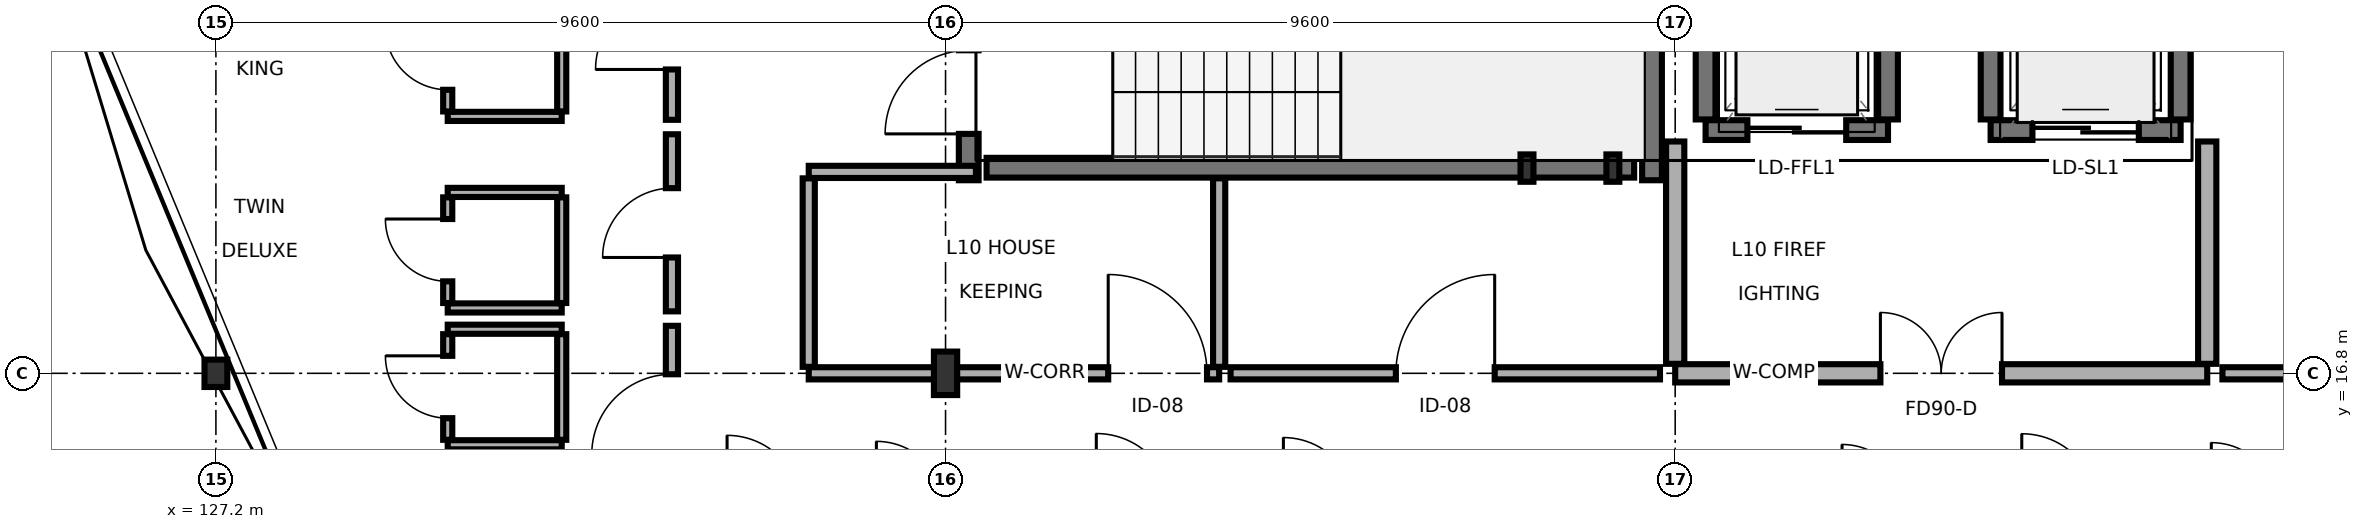
"""IFC4 building model, lengths in metres.
Left out: names, types, materials, properties, quantities, classifications, styles, units other than length and angle.
Written with IfcOpenShell. Run it as: python <this file> out.ifc"""

import sys

from ifc_helpers import new_model, si_unit, direction, frame, frame_2d, origin, origin_2d, place, context, subcontext, project, spatial, rectangle, i_section, extrude, element, fill, save


model = new_model("IFC4")
c1 = context("Model", 3, precision=1e-05, world=origin(), true_north=direction((0.0, 1.0)))
c2 = subcontext(c1, "Body", "Model", "MODEL_VIEW")
j1 = project(units=[si_unit("LENGTHUNIT", "METRE"), si_unit("PLANEANGLEUNIT", "RADIAN")], contexts=[c1])
p1 = place(None, origin())
s1 = spatial("IfcSite", under=j1, at=p1, CompositionType="ELEMENT")
p2 = place(p1, origin())
s2 = spatial("IfcBuilding", under=s1, at=p2, CompositionType="ELEMENT")
p3 = place(p2, frame((0.0, 0.0, 35.1)))
s3 = spatial("IfcBuildingStorey", under=s2, at=p3, CompositionType="ELEMENT", Elevation=35.1)
p4 = place(p3, frame((136.8, 16.8, 0.0), z_axis=(0.0, 0.0, 1.0), x_axis=(1.0, 0.0, 0.0)))
e1 = element("IfcColumn", 1, at=p4, inside=s3, PredefinedType="COLUMN", context=c2, shape_type="SweptSolid", body=[
    extrude(i_section(OverallWidth=0.306, OverallDepth=0.572, WebThickness=0.021, FlangeThickness=0.04, FilletRadius=0.027, at=origin_2d()), origin(), (0.0, 0.0, 1.0), 3.4),
])
for number, where, z_axis, x_axis in (
    (2, (144.45, 19.5, 0.0), (0.0, 0.0, 1.0), (1.0, 0.0, 0.0)),
    (3, (145.58, 19.5, 0.0), (0.0, 0.0, 1.0), (1.0, 0.0, 0.0)),
):
    element("IfcColumn", number, at=place(p3, frame(where, z_axis=z_axis, x_axis=x_axis)), inside=s3, PredefinedType="PILASTER", context=c2, shape_type="SweptSolid", body=[
        extrude(i_section(OverallWidth=0.17, OverallDepth=0.36, WebThickness=0.008, FlangeThickness=0.013, FilletRadius=0.018, at=origin_2d()), origin(), (0.0, 0.0, 1.0), 3.4),
    ])
p5 = place(p3, frame((127.2, 16.8, 0.0), z_axis=(0.0, 0.0, 1.0), x_axis=(1.0, 0.0, 0.0)))
e4 = element("IfcColumn", 4, at=p5, inside=s3, PredefinedType="COLUMN", context=c2, shape_type="SweptSolid", body=[
    extrude(i_section(OverallWidth=0.3, OverallDepth=0.36, WebThickness=0.012, FlangeThickness=0.022, FilletRadius=0.027, at=origin_2d()), origin(), (0.0, 0.0, 1.0), 3.4),
])
p6 = place(p3, frame((137.105, 19.34, 0.0), z_axis=(0.0, 0.0, 1.0), x_axis=(0.0, 1.0, 0.0)))
e5 = element("IfcWall", 5, at=p6, inside=s3, PredefinedType="SHEAR", context=c2, shape_type="SweptSolid", body=[
    extrude(rectangle(XDim=4.27, YDim=0.26, at=frame_2d((2.135, 0.0))), origin(), (0.0, 0.0, 1.0), 3.165),
])
p7 = place(p6, frame((0.61, 0.0, 0.0)))
e6 = element("IfcOpeningElement", 6, at=p7, cuts=e5, PredefinedType="OPENING", context=c2, shape_type="SweptSolid", body=[
    extrude(rectangle(XDim=1.1, YDim=2.2, at=frame_2d((0.55, 1.1))), frame((0.0, 0.14, 0.0), z_axis=(0.0, -1.0, 0.0), x_axis=(1.0, 0.0, 0.0)), (0.0, 0.0, 1.0), 0.28),
])
p8 = place(p3, frame((146.095, 19.34, 0.0), z_axis=(0.0, 0.0, 1.0), x_axis=(0.0, 1.0, 0.0)))
e7 = element("IfcWall", 7, at=p8, inside=s3, PredefinedType="SHEAR", context=c2, shape_type="SweptSolid", body=[
    extrude(rectangle(XDim=4.27, YDim=0.26, at=frame_2d((2.135, 0.0))), origin(), (0.0, 0.0, 1.0), 3.165),
])
p9 = place(p3, frame((137.34, 19.505, 0.0), z_axis=(0.0, 0.0, 1.0), x_axis=(1.0, 0.0, 0.0)))
e8 = element("IfcWall", 8, at=p9, inside=s3, PredefinedType="SHEAR", context=c2, shape_type="SweptSolid", body=[
    extrude(rectangle(XDim=8.52, YDim=0.26, at=frame_2d((4.26, 0.0))), origin(), (0.0, 0.0, 1.0), 3.165),
])
p10 = place(p3, frame((146.8, 20.0, 0.0), z_axis=(0.0, 0.0, 1.0), x_axis=(1.0, 0.0, 0.0)))
e9 = element("IfcWall", 9, at=p10, inside=s3, PredefinedType="SHEAR", context=c2, shape_type="SweptSolid", body=[
    extrude(rectangle(XDim=2.4, YDim=0.26, at=frame_2d((1.2, 0.0))), origin(), (0.0, 0.0, 1.0), 3.165),
])
p11 = place(p10, frame((0.55, 0.0, 0.0)))
e10 = element("IfcOpeningElement", 10, at=p11, cuts=e9, PredefinedType="OPENING", context=c2, shape_type="SweptSolid", body=[
    extrude(rectangle(XDim=1.3, YDim=2.25, at=frame_2d((0.65, 1.125))), frame((0.0, 0.14, 0.0), z_axis=(0.0, -1.0, 0.0), x_axis=(1.0, 0.0, 0.0)), (0.0, 0.0, 1.0), 0.28),
])
for number, where, z_axis, x_axis in (
    (11, (146.8, 20.14, 0.0), (0.0, 0.0, 1.0), (0.0, 1.0, 0.0)),
    (12, (149.2, 20.14, 0.0), (0.0, 0.0, 1.0), (0.0, 1.0, 0.0)),
):
    element("IfcWall", number, at=place(p3, frame(where, z_axis=z_axis, x_axis=x_axis)), inside=s3, PredefinedType="SHEAR", context=c2, shape_type="SweptSolid", body=[
        extrude(rectangle(XDim=2.52, YDim=0.26, at=frame_2d((1.26, 0.0))), origin(), (0.0, 0.0, 1.0), 3.165),
    ])
p12 = place(p3, frame((150.55, 20.0, 0.0), z_axis=(0.0, 0.0, 1.0), x_axis=(1.0, 0.0, 0.0)))
e13 = element("IfcWall", 13, at=p12, inside=s3, PredefinedType="SHEAR", context=c2, shape_type="SweptSolid", body=[
    extrude(rectangle(XDim=2.5, YDim=0.26, at=frame_2d((1.25, 0.0))), origin(), (0.0, 0.0, 1.0), 3.165),
])
p13 = place(p12, frame((0.55, 0.0, 0.0)))
e14 = element("IfcOpeningElement", 14, at=p13, cuts=e13, PredefinedType="OPENING", context=c2, shape_type="SweptSolid", body=[
    extrude(rectangle(XDim=1.4, YDim=2.3, at=frame_2d((0.7, 1.15))), frame((0.0, 0.14, 0.0), z_axis=(0.0, -1.0, 0.0), x_axis=(1.0, 0.0, 0.0)), (0.0, 0.0, 1.0), 0.28),
])
for number, where, z_axis, x_axis in (
    (15, (150.55, 20.14, 0.0), (0.0, 0.0, 1.0), (0.0, 1.0, 0.0)),
    (16, (153.05, 20.14, 0.0), (0.0, 0.0, 1.0), (0.0, 1.0, 0.0)),
):
    element("IfcWall", number, at=place(p3, frame(where, z_axis=z_axis, x_axis=x_axis)), inside=s3, PredefinedType="SHEAR", context=c2, shape_type="SweptSolid", body=[
        extrude(rectangle(XDim=2.52, YDim=0.26, at=frame_2d((1.26, 0.0))), origin(), (0.0, 0.0, 1.0), 3.165),
    ])
p14 = place(p3, frame((146.4, 16.8, 0.0), z_axis=(0.0, 0.0, 1.0), x_axis=(1.0, 0.0, 0.0)))
e17 = element("IfcWall", 17, at=p14, inside=s3, PredefinedType="SOLIDWALL", context=c2, shape_type="SweptSolid", body=[
    extrude(rectangle(XDim=7.0, YDim=0.24, at=frame_2d((3.5, 0.0))), origin(), (0.0, 0.0, 1.0), 2.7),
])
p15 = place(p14, frame((2.7, 0.0, 0.0)))
e18 = element("IfcOpeningElement", 18, at=p15, cuts=e17, PredefinedType="OPENING", context=c2, shape_type="SweptSolid", body=[
    extrude(rectangle(XDim=1.6, YDim=2.2, at=frame_2d((0.8, 1.1))), frame((0.0, 0.13, 0.0), z_axis=(0.0, -1.0, 0.0), x_axis=(1.0, 0.0, 0.0)), (0.0, 0.0, 1.0), 0.26),
])
for number, where, z_axis, x_axis in (
    (19, (146.4, 16.925, 0.0), (0.0, 0.0, 1.0), (0.0, 1.0, 0.0)),
    (20, (153.4, 16.925, 0.0), (0.0, 0.0, 1.0), (0.0, 1.0, 0.0)),
):
    element("IfcWall", number, at=place(p3, frame(where, z_axis=z_axis, x_axis=x_axis)), inside=s3, PredefinedType="SOLIDWALL", context=c2, shape_type="SweptSolid", body=[
        extrude(rectangle(XDim=2.925, YDim=0.24, at=frame_2d((1.462, 0.0))), origin(), (0.0, 0.0, 1.0), 2.7),
    ])
p16 = place(p3, frame((135.0, 16.8, 0.0), z_axis=(0.0, 0.0, 1.0), x_axis=(1.0, 0.0, 0.0)))
e21 = element("IfcWall", 21, at=p16, inside=s3, PredefinedType="PARTITIONING", context=c2, shape_type="SweptSolid", body=[
    extrude(rectangle(XDim=5.4, YDim=0.16, at=frame_2d((2.7, 0.0))), origin(), (0.0, 0.0, 1.0), 2.7),
])
p17 = place(p16, frame((3.94, 0.0, 0.0)))
e22 = element("IfcOpeningElement", 22, at=p17, cuts=e21, PredefinedType="OPENING", context=c2, shape_type="SweptSolid", body=[
    extrude(rectangle(XDim=1.3, YDim=2.2, at=frame_2d((0.65, 1.1))), frame((0.0, 0.09, 0.0), z_axis=(0.0, -1.0, 0.0), x_axis=(1.0, 0.0, 0.0)), (0.0, 0.0, 1.0), 0.18),
])
p18 = place(p3, frame((135.0, 16.885, 0.0), z_axis=(0.0, 0.0, 1.0), x_axis=(0.0, 1.0, 0.0)))
e23 = element("IfcWall", 23, at=p18, inside=s3, PredefinedType="PARTITIONING", context=c2, shape_type="SweptSolid", body=[
    extrude(rectangle(XDim=2.48, YDim=0.16, at=frame_2d((1.24, 0.0))), origin(), (0.0, 0.0, 1.0), 2.75),
])
p19 = place(p3, frame((140.4, 16.885, 0.0), z_axis=(0.0, 0.0, 1.0), x_axis=(0.0, 1.0, 0.0)))
e24 = element("IfcWall", 24, at=p19, inside=s3, PredefinedType="PARTITIONING", context=c2, shape_type="SweptSolid", body=[
    extrude(rectangle(XDim=2.48, YDim=0.16, at=frame_2d((1.24, 0.0))), origin(), (0.0, 0.0, 1.0), 2.7),
])
p20 = place(p3, frame((135.0, 19.45, 0.0), z_axis=(0.0, 0.0, 1.0), x_axis=(1.0, 0.0, 0.0)))
e25 = element("IfcWall", 25, at=p20, inside=s3, PredefinedType="PARTITIONING", context=c2, shape_type="SweptSolid", body=[
    extrude(rectangle(XDim=2.2, YDim=0.16, at=frame_2d((1.1, 0.0))), origin(), (0.0, 0.0, 1.0), 2.7),
])
p21 = place(p3, frame((140.55, 16.8, 0.0), z_axis=(0.0, 0.0, 1.0), x_axis=(1.0, 0.0, 0.0)))
e26 = element("IfcWall", 26, at=p21, inside=s3, PredefinedType="PARTITIONING", context=c2, shape_type="SweptSolid", body=[
    extrude(rectangle(XDim=5.65, YDim=0.16, at=frame_2d((2.825, 0.0))), origin(), (0.0, 0.0, 1.0), 2.7),
])
p22 = place(p21, frame((2.175, 0.0, 0.0)))
e27 = element("IfcOpeningElement", 27, at=p22, cuts=e26, PredefinedType="OPENING", context=c2, shape_type="SweptSolid", body=[
    extrude(rectangle(XDim=1.3, YDim=2.2, at=frame_2d((0.65, 1.1))), frame((0.0, 0.09, 0.0), z_axis=(0.0, -1.0, 0.0), x_axis=(1.0, 0.0, 0.0)), (0.0, 0.0, 1.0), 0.18),
])
p23 = place(p3, frame((153.6, 16.8, 0.0), z_axis=(0.0, 0.0, 1.0), x_axis=(1.0, 0.0, 0.0)))
e28 = element("IfcWall", 28, at=p23, inside=s3, PredefinedType="PARTITIONING", context=c2, shape_type="SweptSolid", body=[
    extrude(rectangle(XDim=1.8, YDim=0.16, at=frame_2d((0.9, 0.0))), origin(), (0.0, 0.0, 1.0), 2.7),
])
p24 = place(p3, frame((133.2, 20.135, 0.0), z_axis=(0.0, 0.0, 1.0), x_axis=(0.0, 1.0, 0.0)))
e29 = element("IfcWall", 29, at=p24, inside=s3, PredefinedType="PARTITIONING", context=c2, shape_type="SweptSolid", body=[
    extrude(rectangle(XDim=2.33, YDim=0.16, at=frame_2d((1.165, 0.0))), origin(), (0.0, 0.0, 1.0), 3.165),
])
p25 = place(p24, frame((0.663, 0.0, 0.0)))
e30 = element("IfcOpeningElement", 30, at=p25, cuts=e29, PredefinedType="OPENING", context=c2, shape_type="SweptSolid", body=[
    extrude(rectangle(XDim=1.005, YDim=2.05, at=frame_2d((0.502, 1.025))), frame((0.0, 0.09, 0.0), z_axis=(0.0, -1.0, 0.0), x_axis=(1.0, 0.0, 0.0)), (0.0, 0.0, 1.0), 0.18),
])
p26 = place(p3, frame((130.25, 20.18, 0.0), z_axis=(0.0, 0.0, 1.0), x_axis=(1.0, 0.0, 0.0)))
e31 = element("IfcWall", 31, at=p26, inside=s3, PredefinedType="PARTITIONING", context=c2, shape_type="SweptSolid", body=[
    extrude(rectangle(XDim=1.5, YDim=0.12, at=frame_2d((0.75, 0.0))), origin(), (0.0, 0.0, 1.0), 3.165),
])
p27 = place(p3, frame((130.25, 20.245, 0.0), z_axis=(0.0, 0.0, 1.0), x_axis=(0.0, 1.0, 0.0)))
e32 = element("IfcWall", 32, at=p27, inside=s3, PredefinedType="PARTITIONING", context=c2, shape_type="SweptSolid", body=[
    extrude(rectangle(XDim=1.39, YDim=0.12, at=frame_2d((0.695, 0.0))), origin(), (0.0, 0.0, 1.0), 3.165),
])
p28 = place(p27, frame((0.285, 0.0, 0.0)))
e33 = element("IfcOpeningElement", 33, at=p28, cuts=e32, PredefinedType="OPENING", context=c2, shape_type="SweptSolid", body=[
    extrude(rectangle(XDim=0.82, YDim=2.08, at=frame_2d((0.41, 1.04))), frame((0.0, 0.07, 0.0), z_axis=(0.0, -1.0, 0.0), x_axis=(1.0, 0.0, 0.0)), (0.0, 0.0, 1.0), 0.14),
])
p29 = place(p3, frame((131.75, 20.245, 0.0), z_axis=(0.0, 0.0, 1.0), x_axis=(0.0, 1.0, 0.0)))
e34 = element("IfcWall", 34, at=p29, inside=s3, PredefinedType="PARTITIONING", context=c2, shape_type="SweptSolid", body=[
    extrude(rectangle(XDim=1.39, YDim=0.12, at=frame_2d((0.695, 0.0))), origin(), (0.0, 0.0, 1.0), 3.165),
])
p30 = place(p3, frame((133.2, 17.615, 0.0), z_axis=(0.0, 0.0, 1.0), x_axis=(0.0, 1.0, 0.0)))
e35 = element("IfcWall", 35, at=p30, inside=s3, PredefinedType="PARTITIONING", context=c2, shape_type="SweptSolid", body=[
    extrude(rectangle(XDim=2.33, YDim=0.16, at=frame_2d((1.165, 0.0))), origin(), (0.0, 0.0, 1.0), 3.165),
])
p31 = place(p30, frame((0.709, 0.0, 0.0)))
e36 = element("IfcOpeningElement", 36, at=p31, cuts=e35, PredefinedType="OPENING", context=c2, shape_type="SweptSolid", body=[
    extrude(rectangle(XDim=0.912, YDim=2.13, at=frame_2d((0.456, 1.065))), frame((0.0, 0.09, 0.0), z_axis=(0.0, -1.0, 0.0), x_axis=(1.0, 0.0, 0.0)), (0.0, 0.0, 1.0), 0.18),
])
for number, where, z_axis, x_axis in (
    (37, (130.25, 17.66, 0.0), (0.0, 0.0, 1.0), (1.0, 0.0, 0.0)),
    (38, (130.25, 19.18, 0.0), (0.0, 0.0, 1.0), (1.0, 0.0, 0.0)),
):
    element("IfcWall", number, at=place(p3, frame(where, z_axis=z_axis, x_axis=x_axis)), inside=s3, PredefinedType="PARTITIONING", context=c2, shape_type="SweptSolid", body=[
        extrude(rectangle(XDim=1.5, YDim=0.12, at=frame_2d((0.75, 0.0))), origin(), (0.0, 0.0, 1.0), 3.165),
    ])
p32 = place(p3, frame((130.25, 17.725, 0.0), z_axis=(0.0, 0.0, 1.0), x_axis=(0.0, 1.0, 0.0)))
e39 = element("IfcWall", 39, at=p32, inside=s3, PredefinedType="PARTITIONING", context=c2, shape_type="SweptSolid", body=[
    extrude(rectangle(XDim=1.39, YDim=0.12, at=frame_2d((0.695, 0.0))), origin(), (0.0, 0.0, 1.0), 3.165),
])
p33 = place(p32, frame((0.285, 0.0, 0.0)))
e40 = element("IfcOpeningElement", 40, at=p33, cuts=e39, PredefinedType="OPENING", context=c2, shape_type="SweptSolid", body=[
    extrude(rectangle(XDim=0.82, YDim=2.08, at=frame_2d((0.41, 1.04))), frame((0.0, 0.07, 0.0), z_axis=(0.0, -1.0, 0.0), x_axis=(1.0, 0.0, 0.0)), (0.0, 0.0, 1.0), 0.14),
])
p34 = place(p3, frame((131.75, 17.725, 0.0), z_axis=(0.0, 0.0, 1.0), x_axis=(0.0, 1.0, 0.0)))
e41 = element("IfcWall", 41, at=p34, inside=s3, PredefinedType="PARTITIONING", context=c2, shape_type="SweptSolid", body=[
    extrude(rectangle(XDim=1.39, YDim=0.12, at=frame_2d((0.695, 0.0))), origin(), (0.0, 0.0, 1.0), 3.165),
])
p35 = place(p3, frame((133.2, 15.095, 0.0), z_axis=(0.0, 0.0, 1.0), x_axis=(0.0, 1.0, 0.0)))
e42 = element("IfcWall", 42, at=p35, inside=s3, PredefinedType="PARTITIONING", context=c2, shape_type="SweptSolid", body=[
    extrude(rectangle(XDim=2.33, YDim=0.16, at=frame_2d((1.165, 0.0))), origin(), (0.0, 0.0, 1.0), 2.75),
])
p36 = place(p35, frame((0.637, 0.0, 0.0)))
e43 = element("IfcOpeningElement", 43, at=p36, cuts=e42, PredefinedType="OPENING", context=c2, shape_type="SweptSolid", body=[
    extrude(rectangle(XDim=1.055, YDim=2.05, at=frame_2d((0.527, 1.025))), frame((0.0, 0.09, 0.0), z_axis=(0.0, -1.0, 0.0), x_axis=(1.0, 0.0, 0.0)), (0.0, 0.0, 1.0), 0.18),
])
for number, where, z_axis, x_axis in (
    (44, (130.25, 15.86, 0.0), (0.0, 0.0, 1.0), (1.0, 0.0, 0.0)),
    (45, (130.25, 17.38, 0.0), (0.0, 0.0, 1.0), (1.0, 0.0, 0.0)),
):
    element("IfcWall", number, at=place(p3, frame(where, z_axis=z_axis, x_axis=x_axis)), inside=s3, PredefinedType="PARTITIONING", context=c2, shape_type="SweptSolid", body=[
        extrude(rectangle(XDim=1.5, YDim=0.12, at=frame_2d((0.75, 0.0))), origin(), (0.0, 0.0, 1.0), 3.165),
    ])
p37 = place(p3, frame((130.25, 15.925, 0.0), z_axis=(0.0, 0.0, 1.0), x_axis=(0.0, 1.0, 0.0)))
e46 = element("IfcWall", 46, at=p37, inside=s3, PredefinedType="PARTITIONING", context=c2, shape_type="SweptSolid", body=[
    extrude(rectangle(XDim=1.39, YDim=0.12, at=frame_2d((0.695, 0.0))), origin(), (0.0, 0.0, 1.0), 2.75),
])
p38 = place(p37, frame((0.285, 0.0, 0.0)))
e47 = element("IfcOpeningElement", 47, at=p38, cuts=e46, PredefinedType="OPENING", context=c2, shape_type="SweptSolid", body=[
    extrude(rectangle(XDim=0.82, YDim=2.08, at=frame_2d((0.41, 1.04))), frame((0.0, 0.07, 0.0), z_axis=(0.0, -1.0, 0.0), x_axis=(1.0, 0.0, 0.0)), (0.0, 0.0, 1.0), 0.14),
])
p39 = place(p3, frame((131.75, 15.925, 0.0), z_axis=(0.0, 0.0, 1.0), x_axis=(0.0, 1.0, 0.0)))
e48 = element("IfcWall", 48, at=p39, inside=s3, PredefinedType="PARTITIONING", context=c2, shape_type="SweptSolid", body=[
    extrude(rectangle(XDim=1.39, YDim=0.12, at=frame_2d((0.695, 0.0))), origin(), (0.0, 0.0, 1.0), 2.75),
])
p40 = place(p7, origin())
e49 = element("IfcDoor", 49, at=p40, inside=s3, OperationType="SINGLE_SWING_LEFT", PredefinedType="DOOR", context=c2, shape_type="SweptSolid", body=[
    extrude(rectangle(XDim=1.1, YDim=2.2, at=frame_2d((0.55, 1.1))), frame((0.0, 0.025, 0.0), z_axis=(0.0, -1.0, 0.0), x_axis=(1.0, 0.0, 0.0)), (0.0, 0.0, 1.0), 0.05),
])
fill(e6, e49)
p41 = place(p11, origin())
e50 = element("IfcDoor", 50, at=p41, inside=s3, OperationType="SLIDING_TO_RIGHT", PredefinedType="DOOR", context=c2, shape_type="SweptSolid", body=[
    extrude(rectangle(XDim=1.3, YDim=2.25, at=frame_2d((0.65, 1.125))), frame((0.0, 0.025, 0.0), z_axis=(0.0, -1.0, 0.0), x_axis=(1.0, 0.0, 0.0)), (0.0, 0.0, 1.0), 0.05),
])
fill(e10, e50)
p42 = place(p13, origin())
e51 = element("IfcDoor", 51, at=p42, inside=s3, OperationType="SLIDING_TO_LEFT", PredefinedType="DOOR", context=c2, shape_type="SweptSolid", body=[
    extrude(rectangle(XDim=1.4, YDim=2.3, at=frame_2d((0.7, 1.15))), frame((0.0, 0.025, 0.0), z_axis=(0.0, -1.0, 0.0), x_axis=(1.0, 0.0, 0.0)), (0.0, 0.0, 1.0), 0.05),
])
fill(e14, e51)
p43 = place(p15, origin())
e52 = element("IfcDoor", 52, at=p43, inside=s3, OperationType="DOUBLE_DOOR_SINGLE_SWING", PredefinedType="DOOR", context=c2, shape_type="SweptSolid", body=[
    extrude(rectangle(XDim=1.6, YDim=2.2, at=frame_2d((0.8, 1.1))), frame((0.0, 0.025, 0.0), z_axis=(0.0, -1.0, 0.0), x_axis=(1.0, 0.0, 0.0)), (0.0, 0.0, 1.0), 0.05),
])
fill(e18, e52)
p44 = place(p17, origin())
e53 = element("IfcDoor", 53, at=p44, inside=s3, OperationType="SINGLE_SWING_LEFT", PredefinedType="DOOR", context=c2, shape_type="SweptSolid", body=[
    extrude(rectangle(XDim=1.3, YDim=2.2, at=frame_2d((0.65, 1.1))), frame((0.0, 0.025, 0.0), z_axis=(0.0, -1.0, 0.0), x_axis=(1.0, 0.0, 0.0)), (0.0, 0.0, 1.0), 0.05),
])
fill(e22, e53)
p45 = place(p22, origin())
e54 = element("IfcDoor", 54, at=p45, inside=s3, OperationType="SINGLE_SWING_RIGHT", PredefinedType="DOOR", context=c2, shape_type="SweptSolid", body=[
    extrude(rectangle(XDim=1.3, YDim=2.2, at=frame_2d((0.65, 1.1))), frame((0.0, 0.025, 0.0), z_axis=(0.0, -1.0, 0.0), x_axis=(1.0, 0.0, 0.0)), (0.0, 0.0, 1.0), 0.05),
])
fill(e27, e54)
p46 = place(p25, origin())
e55 = element("IfcDoor", 55, at=p46, inside=s3, OperationType="SINGLE_SWING_LEFT", PredefinedType="DOOR", context=c2, shape_type="SweptSolid", body=[
    extrude(rectangle(XDim=1.005, YDim=2.05, at=frame_2d((0.502, 1.025))), frame((0.0, 0.025, 0.0), z_axis=(0.0, -1.0, 0.0), x_axis=(1.0, 0.0, 0.0)), (0.0, 0.0, 1.0), 0.05),
])
fill(e30, e55)
p47 = place(p28, origin())
e56 = element("IfcDoor", 56, at=p47, inside=s3, OperationType="SINGLE_SWING_RIGHT", PredefinedType="DOOR", context=c2, shape_type="SweptSolid", body=[
    extrude(rectangle(XDim=0.82, YDim=2.08, at=frame_2d((0.41, 1.04))), frame((0.0, 0.025, 0.0), z_axis=(0.0, -1.0, 0.0), x_axis=(1.0, 0.0, 0.0)), (0.0, 0.0, 1.0), 0.05),
])
fill(e33, e56)
p48 = place(p31, origin())
e57 = element("IfcDoor", 57, at=p48, inside=s3, OperationType="SINGLE_SWING_LEFT", PredefinedType="DOOR", context=c2, shape_type="SweptSolid", body=[
    extrude(rectangle(XDim=0.912, YDim=2.13, at=frame_2d((0.456, 1.065))), frame((0.0, 0.025, 0.0), z_axis=(0.0, -1.0, 0.0), x_axis=(1.0, 0.0, 0.0)), (0.0, 0.0, 1.0), 0.05),
])
fill(e36, e57)
p49 = place(p33, origin())
e58 = element("IfcDoor", 58, at=p49, inside=s3, OperationType="SINGLE_SWING_RIGHT", PredefinedType="DOOR", context=c2, shape_type="SweptSolid", body=[
    extrude(rectangle(XDim=0.82, YDim=2.08, at=frame_2d((0.41, 1.04))), frame((0.0, 0.025, 0.0), z_axis=(0.0, -1.0, 0.0), x_axis=(1.0, 0.0, 0.0)), (0.0, 0.0, 1.0), 0.05),
])
fill(e40, e58)
p50 = place(p36, origin())
e59 = element("IfcDoor", 59, at=p50, inside=s3, OperationType="SINGLE_SWING_LEFT", PredefinedType="DOOR", context=c2, shape_type="SweptSolid", body=[
    extrude(rectangle(XDim=1.055, YDim=2.05, at=frame_2d((0.527, 1.025))), frame((0.0, 0.025, 0.0), z_axis=(0.0, -1.0, 0.0), x_axis=(1.0, 0.0, 0.0)), (0.0, 0.0, 1.0), 0.05),
])
fill(e43, e59)
p51 = place(p38, origin())
e60 = element("IfcDoor", 60, at=p51, inside=s3, OperationType="SINGLE_SWING_RIGHT", PredefinedType="DOOR", context=c2, shape_type="SweptSolid", body=[
    extrude(rectangle(XDim=0.82, YDim=2.08, at=frame_2d((0.41, 1.04))), frame((0.0, 0.025, 0.0), z_axis=(0.0, -1.0, 0.0), x_axis=(1.0, 0.0, 0.0)), (0.0, 0.0, 1.0), 0.05),
])
fill(e47, e60)
save(model, sys.argv[1])
